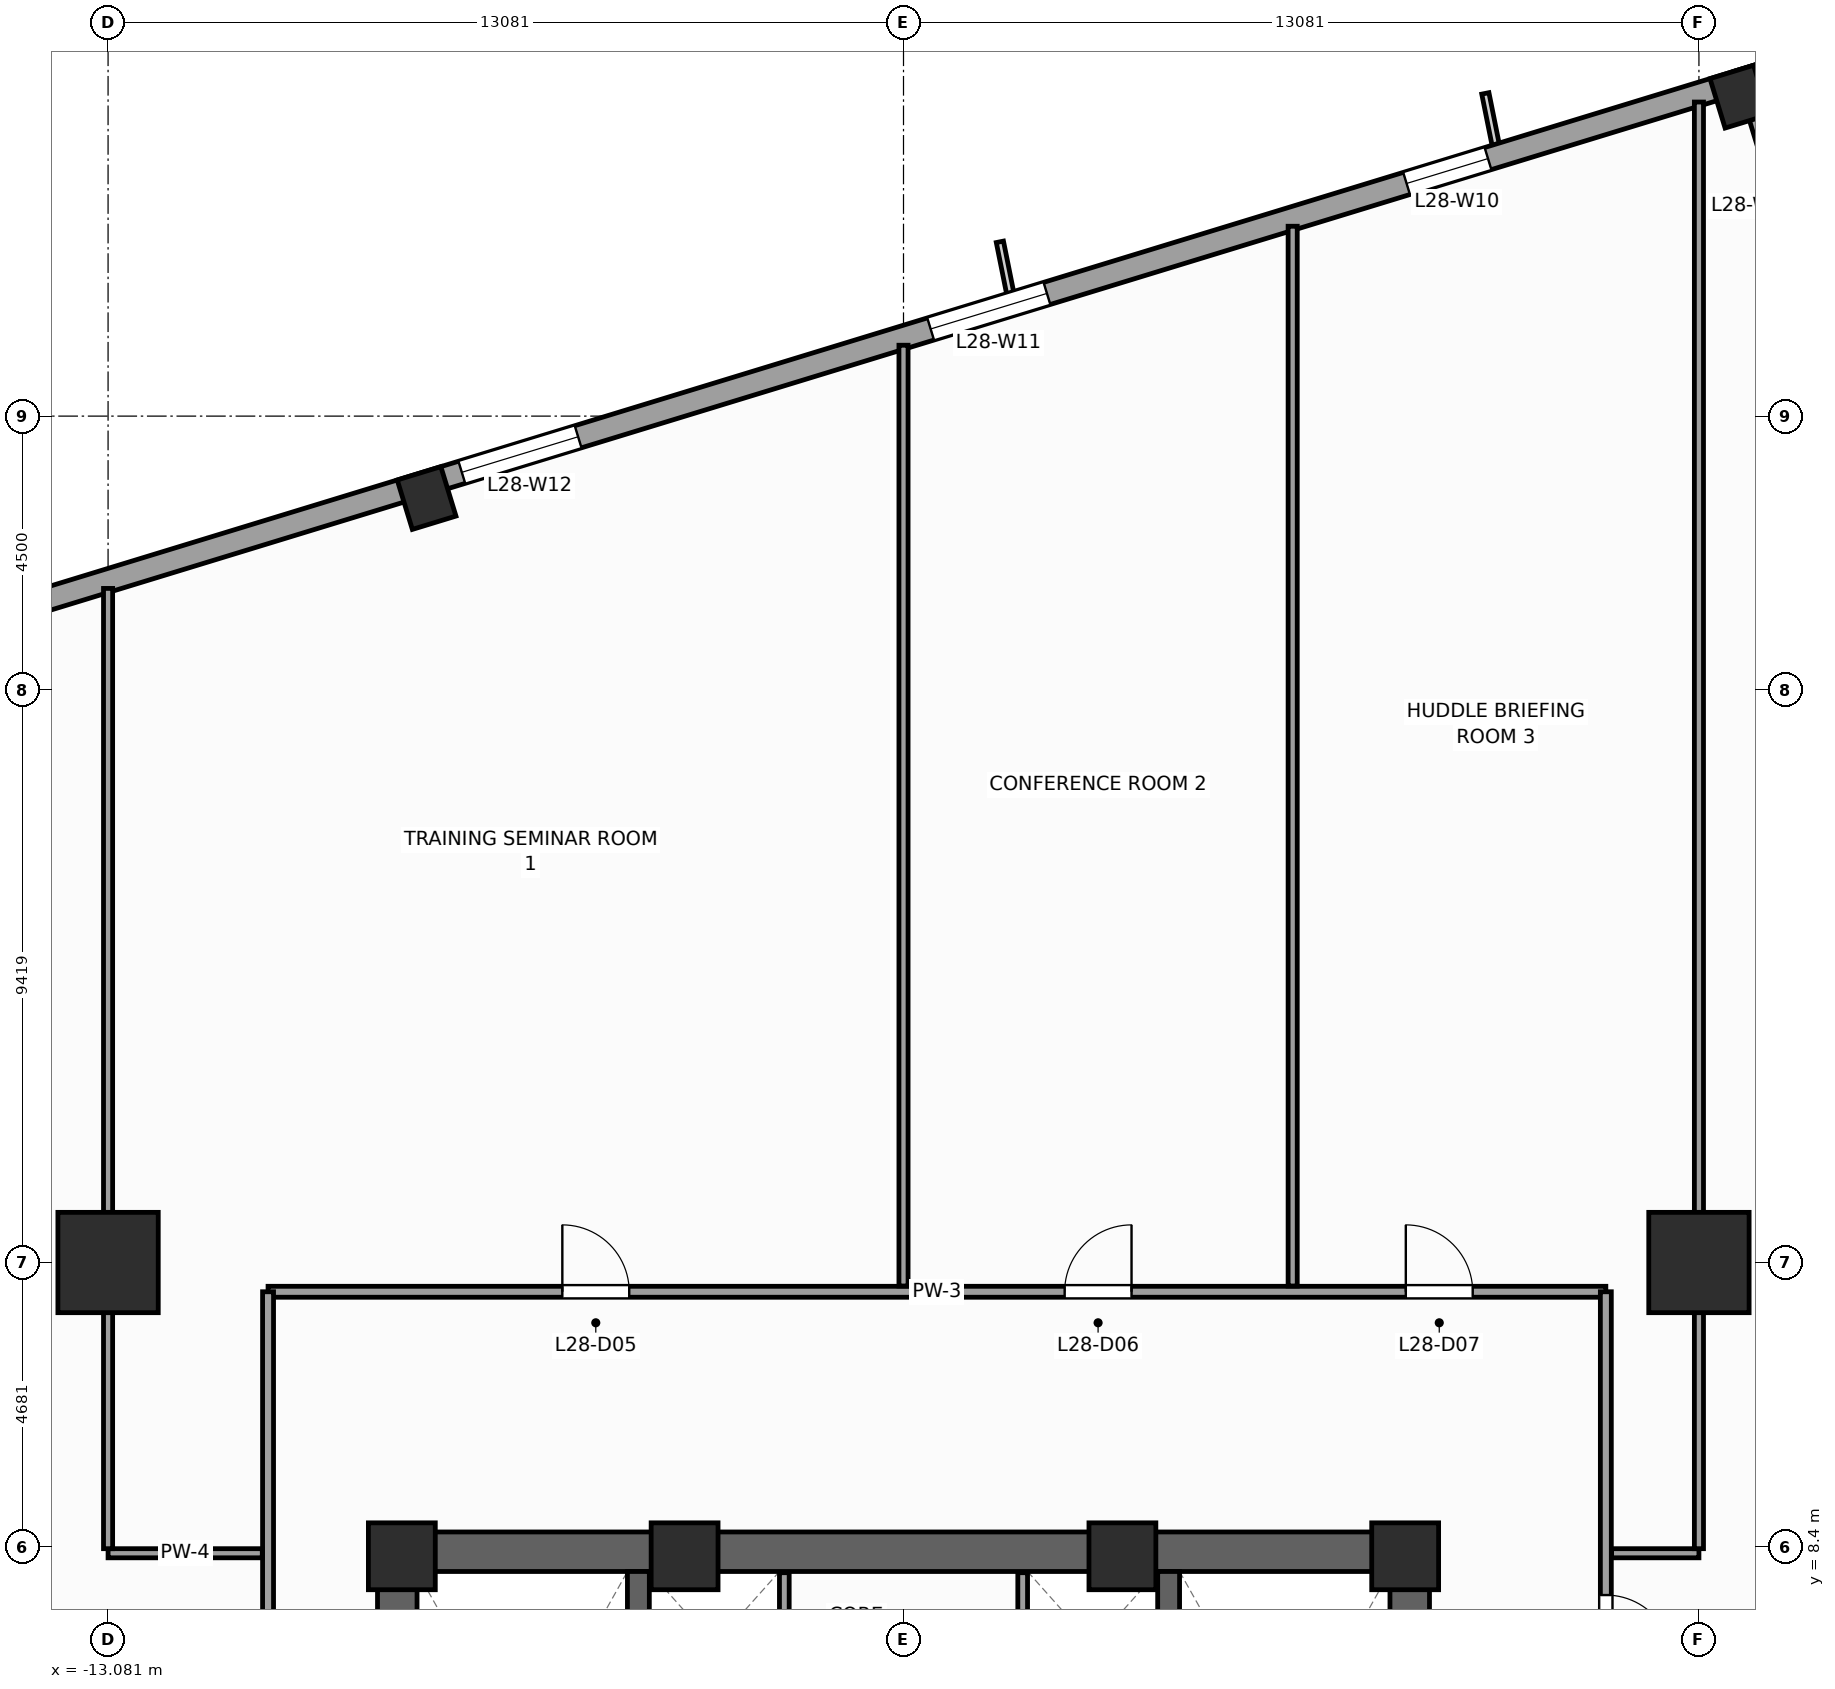
"""IFC4 building model, lengths in metres.
Left out: names, types, materials, properties, quantities, classifications, styles, units other than length and angle.
Written with IfcOpenShell. Run it as: python <this file> out.ifc"""

import sys

from ifc_helpers import new_model, si_unit, direction, frame, frame_2d, origin, origin_2d, place, context, subcontext, project, spatial, rectangle, extrude, source, transform, mapped, element, fill, save


model = new_model("IFC4")
c1 = context("Model", 3, precision=1e-05, world=origin(), true_north=direction((0.0, 1.0)))
c2 = subcontext(c1, "Body", "Model", "MODEL_VIEW")
j1 = project(units=[si_unit("LENGTHUNIT", "METRE"), si_unit("PLANEANGLEUNIT", "RADIAN")], contexts=[c1])
p1 = place(None, origin())
s1 = spatial("IfcSite", under=j1, at=p1, CompositionType="ELEMENT")
p2 = place(p1, origin())
s2 = spatial("IfcBuilding", under=s1, at=p2, CompositionType="ELEMENT")
p3 = place(p2, frame((0.0, 0.0, 119.2)))
s3 = spatial("IfcBuildingStorey", under=s2, at=p3, CompositionType="ELEMENT", Elevation=119.2)
p4 = place(p3, frame((-8.65, 8.325, 0.0), z_axis=(0.0, 0.0, 1.0), x_axis=(1.0, 0.0, 0.0)))
e1 = element("IfcWall", 1, at=p4, inside=s3, PredefinedType="SHEAR", context=c2, shape_type="SweptSolid", body=[
    extrude(rectangle(XDim=17.3, YDim=0.65, at=frame_2d((8.65, 0.0))), origin(), (0.0, 0.0, 1.0), 4.0),
])
p5 = place(p3, frame((-8.325, -8.0, 0.0), z_axis=(0.0, 0.0, 1.0), x_axis=(0.0, 1.0, 0.0)))
e2 = element("IfcWall", 2, at=p5, inside=s3, PredefinedType="SHEAR", context=c2, shape_type="SweptSolid", body=[
    extrude(rectangle(XDim=16.0, YDim=0.65, at=frame_2d((8.0, 0.0))), origin(), (0.0, 0.0, 1.0), 4.0),
])
p6 = place(p5, frame((4.69, 0.0, 0.0)))
e3 = element("IfcOpeningElement", 3, at=p6, cuts=e2, PredefinedType="OPENING", context=c2, shape_type="SweptSolid", body=[
    extrude(rectangle(XDim=1.3, YDim=2.2, at=frame_2d((0.65, 1.1))), frame((0.0, 0.335, 0.0), z_axis=(0.0, -1.0, 0.0), x_axis=(1.0, 0.0, 0.0)), (0.0, 0.0, 1.0), 0.67),
])
p7 = place(p3, frame((8.325, -8.0, 0.0), z_axis=(0.0, 0.0, 1.0), x_axis=(0.0, 1.0, 0.0)))
e4 = element("IfcWall", 4, at=p7, inside=s3, PredefinedType="SHEAR", context=c2, shape_type="SweptSolid", body=[
    extrude(rectangle(XDim=16.0, YDim=0.65, at=frame_2d((8.0, 0.0))), origin(), (0.0, 0.0, 1.0), 4.0),
])
p8 = place(p7, frame((4.69, 0.0, 0.0)))
e5 = element("IfcOpeningElement", 5, at=p8, cuts=e4, PredefinedType="OPENING", context=c2, shape_type="SweptSolid", body=[
    extrude(rectangle(XDim=1.3, YDim=2.2, at=frame_2d((0.65, 1.1))), frame((0.0, 0.335, 0.0), z_axis=(0.0, -1.0, 0.0), x_axis=(1.0, 0.0, 0.0)), (0.0, 0.0, 1.0), 0.67),
])
for number, where, z_axis, x_axis in (
    (6, (-4.36, -8.0, 0.0), (0.0, 0.0, 1.0), (0.0, 1.0, 0.0)),
    (7, (4.36, -8.0, 0.0), (0.0, 0.0, 1.0), (0.0, 1.0, 0.0)),
):
    element("IfcWall", number, at=place(p3, frame(where, z_axis=z_axis, x_axis=x_axis)), inside=s3, PredefinedType="SHEAR", context=c2, shape_type="SweptSolid", body=[
        extrude(rectangle(XDim=16.0, YDim=0.36, at=frame_2d((8.0, 0.0))), origin(), (0.0, 0.0, 1.0), 4.0),
    ])
m1 = source(origin(), c2, "Body", "SweptSolid", [
    extrude(rectangle(XDim=1.1, YDim=1.1, at=origin_2d()), origin(), (0.0, 0.0, 1.0), 4.0),
])
for number, where, z_axis, x_axis in (
    (8, (8.25, 8.25, 0.0), (0.0, 0.0, 1.0), (1.0, 0.0, 0.0)),
    (9, (-8.25, 8.25, 0.0), (0.0, 0.0, 1.0), (1.0, 0.0, 0.0)),
    (10, (-3.6, 8.25, 0.0), (0.0, 0.0, 1.0), (1.0, 0.0, 0.0)),
    (11, (3.6, 8.25, 0.0), (0.0, 0.0, 1.0), (1.0, 0.0, 0.0)),
):
    element("IfcColumn", number, at=place(p3, frame(where, z_axis=z_axis, x_axis=x_axis)), inside=s3, PredefinedType="PILASTER", context=c2, shape_type="MappedRepresentation", body=[
        mapped(m1, transform((0.0, 0.0, 0.0), scale=1.0)),
    ])
m2 = source(origin(), c2, "Body", "SweptSolid", [
    extrude(rectangle(XDim=1.65, YDim=1.65, at=origin_2d()), origin(), (0.0, 0.0, 1.0), 4.0),
])
for number, where, z_axis, x_axis in (
    (12, (13.081, 13.081, 0.0), (0.0, 0.0, 1.0), (1.0, 0.0, 0.0)),
    (13, (-13.081, 13.081, 0.0), (0.0, 0.0, 1.0), (1.0, 0.0, 0.0)),
):
    element("IfcColumn", number, at=place(p3, frame(where, z_axis=z_axis, x_axis=x_axis)), inside=s3, PredefinedType="COLUMN", context=c2, shape_type="MappedRepresentation", body=[
        mapped(m2, transform((0.0, 0.0, 0.0), scale=1.0)),
    ])
m3 = source(origin(), c2, "Body", "SweptSolid", [
    extrude(rectangle(XDim=0.75, YDim=0.85, at=origin_2d()), origin(), (0.0, 0.0, 1.0), 4.0),
])
for number, where, z_axis, x_axis in (
    (14, (13.746, 32.253, 0.0), (0.0, 0.0, 1.0), (0.956, 0.292, 0.0)),
    (15, (-7.843, 25.653, 0.0), (0.0, 0.0, 1.0), (0.956, 0.292, 0.0)),
):
    element("IfcColumn", number, at=place(p3, frame(where, z_axis=z_axis, x_axis=x_axis)), inside=s3, PredefinedType="COLUMN", context=c2, shape_type="MappedRepresentation", body=[
        mapped(m3, transform((0.0, 0.0, 0.0), scale=1.0)),
    ])
p9 = place(p3, frame((15.144, 28.482, 0.0), z_axis=(0.0, 0.0, 1.0), x_axis=(-0.292373601522, 0.956304176051, 0.0)))
e16 = element("IfcWall", 16, at=p9, inside=s3, PredefinedType="STANDARD", context=c2, shape_type="SweptSolid", body=[
    extrude(rectangle(XDim=4.44, YDim=0.38, at=frame_2d((2.22, 0.0))), origin(), (0.0, 0.0, 1.0), 3.04),
])
p10 = place(p9, frame((1.52, 0.0, 0.51)))
e17 = element("IfcOpeningElement", 17, at=p10, cuts=e16, PredefinedType="OPENING", context=c2, shape_type="SweptSolid", body=[
    extrude(rectangle(XDim=1.4, YDim=2.4, at=frame_2d((0.7, 1.2))), frame((0.0, 0.2, 0.0), z_axis=(0.0, -1.0, 0.0), x_axis=(1.0, 0.0, 0.0)), (0.0, 0.0, 1.0), 0.4),
])
p11 = place(p3, frame((14.265, 32.658, 0.0), z_axis=(0.0, 0.0, 1.0), x_axis=(-0.956304320851, -0.292373127906, 0.0)))
e18 = element("IfcWall", 18, at=p11, inside=s3, PredefinedType="STANDARD", context=c2, shape_type="SweptSolid", body=[
    extrude(rectangle(XDim=46.38, YDim=0.38, at=frame_2d((23.19, 0.0))), origin(), (0.0, 0.0, 1.0), 3.14),
])
p12 = place(p11, frame((4.865, 0.0, 0.51)))
e19 = element("IfcOpeningElement", 19, at=p12, cuts=e18, PredefinedType="OPENING", context=c2, shape_type="SweptSolid", body=[
    extrude(rectangle(XDim=1.4, YDim=2.4, at=frame_2d((0.7, 1.2))), frame((0.0, 0.2, 0.0), z_axis=(0.0, -1.0, 0.0), x_axis=(1.0, 0.0, 0.0)), (0.0, 0.0, 1.0), 0.4),
])
p13 = place(p11, frame((12.45, 0.0, 0.51)))
e20 = element("IfcOpeningElement", 20, at=p13, cuts=e18, PredefinedType="OPENING", context=c2, shape_type="SweptSolid", body=[
    extrude(rectangle(XDim=2.0, YDim=2.4, at=frame_2d((1.0, 1.2))), frame((0.0, 0.2, 0.0), z_axis=(0.0, -1.0, 0.0), x_axis=(1.0, 0.0, 0.0)), (0.0, 0.0, 1.0), 0.4),
])
p14 = place(p11, frame((20.512, 0.0, 0.51)))
e21 = element("IfcOpeningElement", 21, at=p14, cuts=e18, PredefinedType="OPENING", context=c2, shape_type="SweptSolid", body=[
    extrude(rectangle(XDim=2.0, YDim=2.4, at=frame_2d((1.0, 1.2))), frame((0.0, 0.2, 0.0), z_axis=(0.0, -1.0, 0.0), x_axis=(1.0, 0.0, 0.0)), (0.0, 0.0, 1.0), 0.4),
])
p15 = place(p11, frame((30.538, 0.0, 0.51)))
e22 = element("IfcOpeningElement", 22, at=p15, cuts=e18, PredefinedType="OPENING", context=c2, shape_type="SweptSolid", body=[
    extrude(rectangle(XDim=2.0, YDim=2.4, at=frame_2d((1.0, 1.2))), frame((0.0, 0.2, 0.0), z_axis=(0.0, -1.0, 0.0), x_axis=(1.0, 0.0, 0.0)), (0.0, 0.0, 1.0), 0.4),
])
p16 = place(p11, frame((39.187, 0.0, 0.51)))
e23 = element("IfcOpeningElement", 23, at=p16, cuts=e18, PredefinedType="OPENING", context=c2, shape_type="SweptSolid", body=[
    extrude(rectangle(XDim=1.4, YDim=2.4, at=frame_2d((0.7, 1.2))), frame((0.0, 0.2, 0.0), z_axis=(0.0, -1.0, 0.0), x_axis=(1.0, 0.0, 0.0)), (0.0, 0.0, 1.0), 0.4),
])
for number, where, z_axis, x_axis in (
    (24, (-1.96, 4.58, 0.0), (0.0, 0.0, 1.0), (0.0, 1.0, 0.0)),
    (25, (1.96, 4.58, 0.0), (0.0, 0.0, 1.0), (0.0, 1.0, 0.0)),
):
    element("IfcWall", number, at=place(p3, frame(where, z_axis=z_axis, x_axis=x_axis)), inside=s3, PredefinedType="PARTITIONING", context=c2, shape_type="SweptSolid", body=[
        extrude(rectangle(XDim=3.4, YDim=0.16, at=frame_2d((1.7, 0.0))), origin(), (0.0, 0.0, 1.0), 3.74),
    ])
p17 = place(p3, frame((-10.45, 12.6, 0.0), z_axis=(0.0, 0.0, 1.0), x_axis=(1.0, 0.0, 0.0)))
e26 = element("IfcWall", 26, at=p17, inside=s3, PredefinedType="PARTITIONING", context=c2, shape_type="SweptSolid", body=[
    extrude(rectangle(XDim=22.0, YDim=0.18, at=frame_2d((11.0, 0.0))), origin(), (0.0, 0.0, 1.0), 3.74),
])
p18 = place(p17, frame((4.839, 0.0, 0.0)))
e27 = element("IfcOpeningElement", 27, at=p18, cuts=e26, PredefinedType="OPENING", context=c2, shape_type="SweptSolid", body=[
    extrude(rectangle(XDim=1.1, YDim=2.2, at=frame_2d((0.55, 1.1))), frame((0.0, 0.1, 0.0), z_axis=(0.0, -1.0, 0.0), x_axis=(1.0, 0.0, 0.0)), (0.0, 0.0, 1.0), 0.2),
])
p19 = place(p17, frame((13.1, 0.0, 0.0)))
e28 = element("IfcOpeningElement", 28, at=p19, cuts=e26, PredefinedType="OPENING", context=c2, shape_type="SweptSolid", body=[
    extrude(rectangle(XDim=1.1, YDim=2.2, at=frame_2d((0.55, 1.1))), frame((0.0, 0.1, 0.0), z_axis=(0.0, -1.0, 0.0), x_axis=(1.0, 0.0, 0.0)), (0.0, 0.0, 1.0), 0.2),
])
p20 = place(p17, frame((18.71, 0.0, 0.0)))
e29 = element("IfcOpeningElement", 29, at=p20, cuts=e26, PredefinedType="OPENING", context=c2, shape_type="SweptSolid", body=[
    extrude(rectangle(XDim=1.1, YDim=2.2, at=frame_2d((0.55, 1.1))), frame((0.0, 0.1, 0.0), z_axis=(0.0, -1.0, 0.0), x_axis=(1.0, 0.0, 0.0)), (0.0, 0.0, 1.0), 0.2),
])
p21 = place(p3, frame((-10.45, -1.05, 0.0), z_axis=(0.0, 0.0, 1.0), x_axis=(0.0, 1.0, 0.0)))
e30 = element("IfcWall", 30, at=p21, inside=s3, PredefinedType="PARTITIONING", context=c2, shape_type="SweptSolid", body=[
    extrude(rectangle(XDim=13.65, YDim=0.18, at=frame_2d((6.825, 0.0))), origin(), (0.0, 0.0, 1.0), 3.74),
])
p22 = place(p21, frame((1.455, 0.0, 0.0)))
e31 = element("IfcOpeningElement", 31, at=p22, cuts=e30, PredefinedType="OPENING", context=c2, shape_type="SweptSolid", body=[
    extrude(rectangle(XDim=0.95, YDim=2.1, at=frame_2d((0.475, 1.05))), frame((0.0, 0.1, 0.0), z_axis=(0.0, -1.0, 0.0), x_axis=(1.0, 0.0, 0.0)), (0.0, 0.0, 1.0), 0.2),
])
p23 = place(p21, frame((6.462, 0.0, 0.0)))
e32 = element("IfcOpeningElement", 32, at=p23, cuts=e30, PredefinedType="OPENING", context=c2, shape_type="SweptSolid", body=[
    extrude(rectangle(XDim=1.1, YDim=2.2, at=frame_2d((0.55, 1.1))), frame((0.0, 0.1, 0.0), z_axis=(0.0, -1.0, 0.0), x_axis=(1.0, 0.0, 0.0)), (0.0, 0.0, 1.0), 0.2),
])
p24 = place(p3, frame((11.55, 3.35, 0.0), z_axis=(0.0, 0.0, 1.0), x_axis=(0.0, 1.0, 0.0)))
e33 = element("IfcWall", 33, at=p24, inside=s3, PredefinedType="PARTITIONING", context=c2, shape_type="SweptSolid", body=[
    extrude(rectangle(XDim=9.25, YDim=0.18, at=frame_2d((4.625, 0.0))), origin(), (0.0, 0.0, 1.0), 3.74),
])
p25 = place(p24, frame((3.163, 0.0, 0.0)))
e34 = element("IfcOpeningElement", 34, at=p25, cuts=e33, PredefinedType="OPENING", context=c2, shape_type="SweptSolid", body=[
    extrude(rectangle(XDim=1.1, YDim=2.2, at=frame_2d((0.55, 1.1))), frame((0.0, 0.1, 0.0), z_axis=(0.0, -1.0, 0.0), x_axis=(1.0, 0.0, 0.0)), (0.0, 0.0, 1.0), 0.2),
])
p26 = place(p3, frame((-10.545, 8.3, 0.0), z_axis=(0.0, 0.0, 1.0), x_axis=(-1.0, 0.0, 0.0)))
e35 = element("IfcWall", 35, at=p26, inside=s3, PredefinedType="PARTITIONING", context=c2, shape_type="SweptSolid", body=[
    extrude(rectangle(XDim=2.536, YDim=0.15, at=frame_2d((1.268, 0.0))), origin(), (0.0, 0.0, 1.0), 3.74),
])
p27 = place(p3, frame((-13.081, 8.375, 0.0), z_axis=(0.0, 0.0, 1.0), x_axis=(0.0, 1.0, 0.0)))
e36 = element("IfcWall", 36, at=p27, inside=s3, PredefinedType="PARTITIONING", context=c2, shape_type="SweptSolid", body=[
    extrude(rectangle(XDim=15.792, YDim=0.15, at=frame_2d((7.896, 0.0))), origin(), (0.0, 0.0, 1.0), 2.732),
])
p28 = place(p3, frame((0.0, 12.695, 0.0), z_axis=(0.0, 0.0, 1.0), x_axis=(0.0, 1.0, 0.0)))
e37 = element("IfcWall", 37, at=p28, inside=s3, PredefinedType="PARTITIONING", context=c2, shape_type="SweptSolid", body=[
    extrude(rectangle(XDim=15.471, YDim=0.15, at=frame_2d((7.735, 0.0))), origin(), (0.0, 0.0, 1.0), 3.74),
])
p29 = place(p3, frame((6.4, 12.695, 0.0), z_axis=(0.0, 0.0, 1.0), x_axis=(0.0, 1.0, 0.0)))
e38 = element("IfcWall", 38, at=p29, inside=s3, PredefinedType="PARTITIONING", context=c2, shape_type="SweptSolid", body=[
    extrude(rectangle(XDim=17.427, YDim=0.15, at=frame_2d((8.714, 0.0))), origin(), (0.0, 0.0, 1.0), 3.74),
])
p30 = place(p3, frame((11.645, 8.3, 0.0), z_axis=(0.0, 0.0, 1.0), x_axis=(1.0, 0.0, 0.0)))
e39 = element("IfcWall", 39, at=p30, inside=s3, PredefinedType="PARTITIONING", context=c2, shape_type="SweptSolid", body=[
    extrude(rectangle(XDim=1.436, YDim=0.15, at=frame_2d((0.718, 0.0))), origin(), (0.0, 0.0, 1.0), 3.74),
])
p31 = place(p3, frame((13.081, 8.375, 0.0), z_axis=(0.0, 0.0, 1.0), x_axis=(0.0, 1.0, 0.0)))
e40 = element("IfcWall", 40, at=p31, inside=s3, PredefinedType="PARTITIONING", context=c2, shape_type="SweptSolid", body=[
    extrude(rectangle(XDim=23.79, YDim=0.15, at=frame_2d((11.895, 0.0))), origin(), (0.0, 0.0, 1.0), 2.732),
])
m4 = source(origin(), c2, "Body", "SweptSolid", [
    extrude(rectangle(XDim=1.4, YDim=2.4, at=frame_2d((0.7, 1.2))), frame((0.0, 0.03, 0.0), z_axis=(0.0, -1.0, 0.0), x_axis=(1.0, 0.0, 0.0)), (0.0, 0.0, 1.0), 0.06),
])
p32 = place(p12, origin())
e41 = element("IfcWindow", 41, at=p32, inside=s3, PartitioningType="SINGLE_PANEL", PredefinedType="WINDOW", context=c2, shape_type="MappedRepresentation", body=[
    mapped(m4, transform((0.0, 0.0, 0.0), scale=1.0)),
])
fill(e19, e41)
m5 = source(origin(), c2, "Body", "SweptSolid", [
    extrude(rectangle(XDim=2.0, YDim=2.4, at=frame_2d((1.0, 1.2))), frame((0.0, 0.03, 0.0), z_axis=(0.0, -1.0, 0.0), x_axis=(1.0, 0.0, 0.0)), (0.0, 0.0, 1.0), 0.06),
])
p33 = place(p13, origin())
e42 = element("IfcWindow", 42, at=p33, inside=s3, PartitioningType="SINGLE_PANEL", PredefinedType="WINDOW", context=c2, shape_type="MappedRepresentation", body=[
    mapped(m5, transform((0.0, 0.0, 0.0), scale=1.0)),
])
fill(e20, e42)
p34 = place(p14, origin())
e43 = element("IfcWindow", 43, at=p34, inside=s3, PartitioningType="SINGLE_PANEL", PredefinedType="WINDOW", context=c2, shape_type="MappedRepresentation", body=[
    mapped(m5, transform((0.0, 0.0, 0.0), scale=1.0)),
])
fill(e21, e43)
m6 = source(origin(), c2, "Body", "SweptSolid", [
    extrude(rectangle(XDim=1.1, YDim=2.2, at=frame_2d((0.55, 1.1))), frame((0.0, 0.025, 0.0), z_axis=(0.0, -1.0, 0.0), x_axis=(1.0, 0.0, 0.0)), (0.0, 0.0, 1.0), 0.05),
])
p35 = place(p18, origin())
e44 = element("IfcDoor", 44, at=p35, inside=s3, OperationType="SINGLE_SWING_LEFT", PredefinedType="DOOR", context=c2, shape_type="MappedRepresentation", body=[
    mapped(m6, transform((0.0, 0.0, 0.0), scale=1.0)),
])
fill(e27, e44)
p36 = place(p19, origin())
e45 = element("IfcDoor", 45, at=p36, inside=s3, OperationType="SINGLE_SWING_RIGHT", PredefinedType="DOOR", context=c2, shape_type="MappedRepresentation", body=[
    mapped(m6, transform((0.0, 0.0, 0.0), scale=1.0)),
])
fill(e28, e45)
p37 = place(p20, origin())
e46 = element("IfcDoor", 46, at=p37, inside=s3, OperationType="SINGLE_SWING_LEFT", PredefinedType="DOOR", context=c2, shape_type="MappedRepresentation", body=[
    mapped(m6, transform((0.0, 0.0, 0.0), scale=1.0)),
])
fill(e29, e46)
p38 = place(p25, frame((1.1, 0.0, 0.0), z_axis=(0.0, 0.0, 1.0), x_axis=(-1.0, 0.0, 0.0)))
e47 = element("IfcDoor", 47, at=p38, inside=s3, OperationType="SINGLE_SWING_LEFT", PredefinedType="DOOR", context=c2, shape_type="MappedRepresentation", body=[
    mapped(m6, transform((0.0, 0.0, 0.0), scale=1.0)),
])
fill(e34, e47)
save(model, sys.argv[1])
